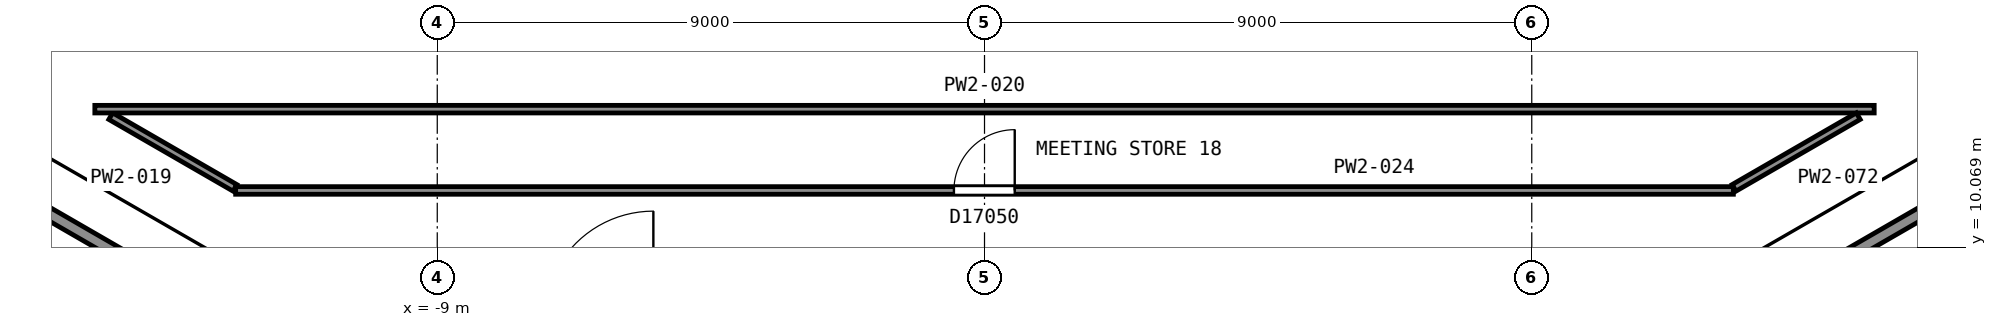
"""IFC4 building model, lengths in metres.
Left out: names, types, materials, properties, quantities, classifications, styles, units other than length and angle.
Written with IfcOpenShell. Run it as: python <this file> out.ifc"""

import sys

from ifc_helpers import new_model, si_unit, direction, frame, frame_2d, origin, place, context, subcontext, project, spatial, rectangle, extrude, element, fill, save


model = new_model("IFC4")
c1 = context("Model", 3, precision=1e-05, world=origin(), true_north=direction((0.0, 1.0)))
c2 = subcontext(c1, "Body", "Model", "MODEL_VIEW")
j1 = project(units=[si_unit("LENGTHUNIT", "METRE"), si_unit("PLANEANGLEUNIT", "RADIAN")], contexts=[c1])
p1 = place(None, origin())
s1 = spatial("IfcSite", under=j1, at=p1, CompositionType="ELEMENT")
p2 = place(p1, origin())
s2 = spatial("IfcBuilding", under=s1, at=p2, CompositionType="ELEMENT")
p3 = place(p2, frame((0.0, 0.0, 80.0)))
s3 = spatial("IfcBuildingStorey", under=s2, at=p3, CompositionType="ELEMENT", Elevation=80.0)
for number, where, z_axis, x_axis in (
    (1, (6.178, 5.299, 0.0), (0.0, 0.0, 1.0), (0.866, 0.5, 0.0)),
    (2, (-6.178, 5.299, 0.0), (0.0, 0.0, 1.0), (-0.866, 0.5, 0.0)),
):
    element("IfcWall", number, at=place(p3, frame(where, z_axis=z_axis, x_axis=x_axis)), inside=s3, PredefinedType="PARTITIONING", context=c2, shape_type="SweptSolid", body=[
        extrude(rectangle(XDim=12.0, YDim=0.2, at=frame_2d((6.0, 0.0))), origin(), (0.0, 0.0, 1.0), 3.35),
    ])
p4 = place(p3, frame((-14.37, 12.222, 0.0), z_axis=(0.0, 0.0, 1.0), x_axis=(0.866063239147, -0.499934461503, 0.0)))
e3 = element("IfcWall", 3, at=p4, inside=s3, PredefinedType="PARTITIONING", context=c2, shape_type="SweptSolid", body=[
    extrude(rectangle(XDim=2.359, YDim=0.125, at=frame_2d((1.18, 0.0))), origin(), (0.0, 0.0, 1.0), 2.613),
])
p5 = place(p3, frame((-14.632, 12.337, 0.0), z_axis=(0.0, 0.0, 1.0), x_axis=(1.0, 0.0, 0.0)))
e4 = element("IfcWall", 4, at=p5, inside=s3, PredefinedType="PARTITIONING", context=c2, shape_type="SweptSolid", body=[
    extrude(rectangle(XDim=29.263, YDim=0.125, at=frame_2d((14.632, 0.0))), origin(), (0.0, 0.0, 1.0), 2.613),
])
p6 = place(p3, frame((-12.315, 11.0, 0.0), z_axis=(0.0, 0.0, 1.0), x_axis=(1.0, 0.0, 0.0)))
e5 = element("IfcWall", 5, at=p6, inside=s3, PredefinedType="PARTITIONING", context=c2, shape_type="SweptSolid", body=[
    extrude(rectangle(XDim=24.631, YDim=0.125, at=frame_2d((12.315, 0.0))), origin(), (0.0, 0.0, 1.0), 2.613),
])
p7 = place(p6, frame((11.812, 0.0, 0.0)))
e6 = element("IfcOpeningElement", 6, at=p7, cuts=e5, PredefinedType="OPENING", context=c2, shape_type="SweptSolid", body=[
    extrude(rectangle(XDim=1.0, YDim=2.1, at=frame_2d((0.5, 1.05))), frame((0.0, 0.073, 0.0), z_axis=(0.0, -1.0, 0.0), x_axis=(1.0, 0.0, 0.0)), (0.0, 0.0, 1.0), 0.145),
])
p8 = place(p3, frame((12.327, 11.042, 0.0), z_axis=(0.0, 0.0, 1.0), x_axis=(0.866063239147, 0.499934461503, 0.0)))
e7 = element("IfcWall", 7, at=p8, inside=s3, PredefinedType="PARTITIONING", context=c2, shape_type="SweptSolid", body=[
    extrude(rectangle(XDim=2.359, YDim=0.125, at=frame_2d((1.18, 0.0))), origin(), (0.0, 0.0, 1.0), 2.613),
])
p9 = place(p7, origin())
e8 = element("IfcDoor", 8, at=p9, inside=s3, OperationType="SINGLE_SWING_RIGHT", PredefinedType="DOOR", context=c2, shape_type="SweptSolid", body=[
    extrude(rectangle(XDim=1.0, YDim=2.1, at=frame_2d((0.5, 1.05))), frame((0.0, 0.025, 0.0), z_axis=(0.0, -1.0, 0.0), x_axis=(1.0, 0.0, 0.0)), (0.0, 0.0, 1.0), 0.05),
])
fill(e6, e8)
save(model, sys.argv[1])
